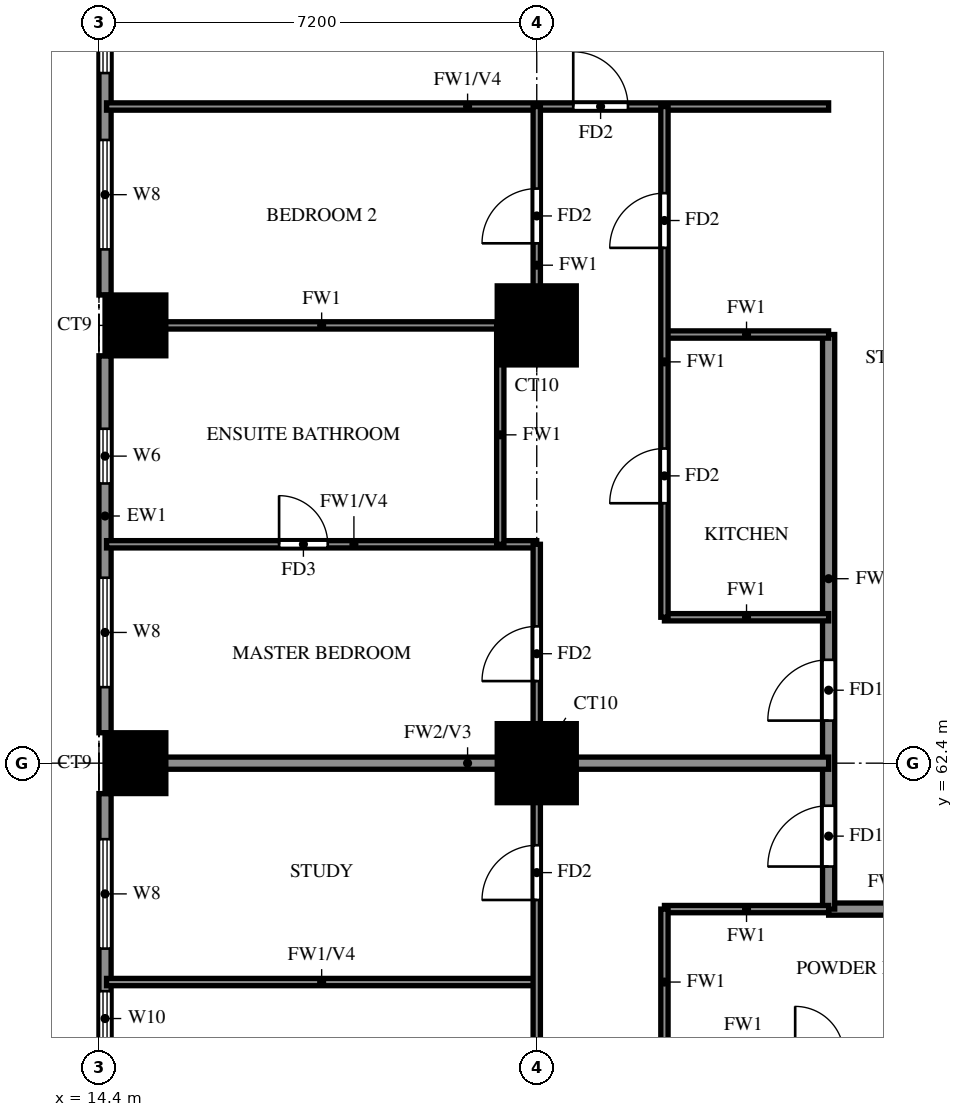
"""IFC4 building model, lengths in metres.
Left out: names, types, materials, properties, quantities, classifications, styles, units other than length and angle.
Written with IfcOpenShell. Run it as: python <this file> out.ifc"""

import sys

from ifc_helpers import new_model, si_unit, direction, frame, frame_2d, origin, origin_2d, place, context, subcontext, project, spatial, rectangle, extrude, source, transform, mapped, element, fill, save


model = new_model("IFC4")
c1 = context("Model", 3, precision=1e-05, world=origin(), true_north=direction((0.0, 1.0)))
c2 = subcontext(c1, "Body", "Model", "MODEL_VIEW")
j1 = project(units=[si_unit("LENGTHUNIT", "METRE"), si_unit("PLANEANGLEUNIT", "RADIAN")], contexts=[c1])
p1 = place(None, origin())
s1 = spatial("IfcSite", under=j1, at=p1, CompositionType="ELEMENT")
p2 = place(p1, origin())
s2 = spatial("IfcBuilding", under=s1, at=p2, CompositionType="ELEMENT")
p3 = place(p2, frame((0.0, 0.0, 83.0)))
s3 = spatial("IfcBuildingStorey", under=s2, at=p3, CompositionType="ELEMENT", Elevation=83.0)
m1 = source(origin(), c2, "Body", "SweptSolid", [
    extrude(rectangle(XDim=1.0, YDim=1.0, at=origin_2d()), origin(), (0.0, 0.0, 1.0), 3.18),
])
p4 = place(p3, frame((15.0, 62.4, 0.0), z_axis=(0.0, 0.0, 1.0), x_axis=(1.0, 0.0, 0.0)))
e1 = element("IfcColumn", 1, at=p4, inside=s3, PredefinedType="COLUMN", context=c2, shape_type="MappedRepresentation", body=[
    mapped(m1, transform((0.0, 0.0, 0.0))),
])
m2 = source(origin(), c2, "Body", "SweptSolid", [
    extrude(rectangle(XDim=1.3, YDim=1.3, at=origin_2d()), origin(), (0.0, 0.0, 1.0), 3.18),
])
p5 = place(p3, frame((21.6, 62.4, 0.0), z_axis=(0.0, 0.0, 1.0), x_axis=(1.0, 0.0, 0.0)))
e2 = element("IfcColumn", 2, at=p5, inside=s3, PredefinedType="COLUMN", context=c2, shape_type="MappedRepresentation", body=[
    mapped(m2, transform((0.0, 0.0, 0.0))),
])
p6 = place(p3, frame((15.0, 69.6, 0.0), z_axis=(0.0, 0.0, 1.0), x_axis=(1.0, 0.0, 0.0)))
e3 = element("IfcColumn", 3, at=p6, inside=s3, PredefinedType="COLUMN", context=c2, shape_type="MappedRepresentation", body=[
    mapped(m1, transform((0.0, 0.0, 0.0))),
])
p7 = place(p3, frame((21.6, 69.6, 0.0), z_axis=(0.0, 0.0, 1.0), x_axis=(1.0, 0.0, 0.0)))
e4 = element("IfcColumn", 4, at=p7, inside=s3, PredefinedType="COLUMN", context=c2, shape_type="MappedRepresentation", body=[
    mapped(m2, transform((0.0, 0.0, 0.0))),
])
p8 = place(p3, frame((14.5, 76.3, 0.0), z_axis=(0.0, 0.0, 1.0), x_axis=(0.0, -1.0, 0.0)))
e5 = element("IfcWall", 5, at=p8, inside=s3, PredefinedType="SOLIDWALL", context=c2, shape_type="SweptSolid", body=[
    extrude(rectangle(XDim=6.2, YDim=0.2, at=frame_2d((3.1, 0.0))), origin(), (0.0, 0.0, 1.0), 3.18),
])
p9 = place(p8, frame((3.65, 0.0, 0.6)))
e6 = element("IfcOpeningElement", 6, at=p9, cuts=e5, PredefinedType="OPENING", context=c2, shape_type="SweptSolid", body=[
    extrude(rectangle(XDim=1.8, YDim=2.4, at=frame_2d((0.9, 1.2))), frame((0.0, 0.11, 0.0), z_axis=(0.0, -1.0, 0.0), x_axis=(1.0, 0.0, 0.0)), (0.0, 0.0, 1.0), 0.22),
])
p10 = place(p8, frame((0.75, 0.0, 0.6)))
e7 = element("IfcOpeningElement", 7, at=p10, cuts=e5, PredefinedType="OPENING", context=c2, shape_type="SweptSolid", body=[
    extrude(rectangle(XDim=1.8, YDim=2.4, at=frame_2d((0.9, 1.2))), frame((0.0, 0.11, 0.0), z_axis=(0.0, -1.0, 0.0), x_axis=(1.0, 0.0, 0.0)), (0.0, 0.0, 1.0), 0.22),
])
p11 = place(p3, frame((14.5, 69.1, 0.0), z_axis=(0.0, 0.0, 1.0), x_axis=(0.0, -1.0, 0.0)))
e8 = element("IfcWall", 8, at=p11, inside=s3, PredefinedType="SOLIDWALL", context=c2, shape_type="SweptSolid", body=[
    extrude(rectangle(XDim=6.2, YDim=0.2, at=frame_2d((3.1, 0.0))), origin(), (0.0, 0.0, 1.0), 3.18),
])
p12 = place(p11, frame((3.65, 0.0, 0.6)))
e9 = element("IfcOpeningElement", 9, at=p12, cuts=e8, PredefinedType="OPENING", context=c2, shape_type="SweptSolid", body=[
    extrude(rectangle(XDim=1.8, YDim=2.4, at=frame_2d((0.9, 1.2))), frame((0.0, 0.11, 0.0), z_axis=(0.0, -1.0, 0.0), x_axis=(1.0, 0.0, 0.0)), (0.0, 0.0, 1.0), 0.22),
])
p13 = place(p11, frame((1.2, 0.0, 1.5)))
e10 = element("IfcOpeningElement", 10, at=p13, cuts=e8, PredefinedType="OPENING", context=c2, shape_type="SweptSolid", body=[
    extrude(rectangle(XDim=0.9, YDim=0.9, at=frame_2d((0.45, 0.45))), frame((0.0, 0.11, 0.0), z_axis=(0.0, -1.0, 0.0), x_axis=(1.0, 0.0, 0.0)), (0.0, 0.0, 1.0), 0.22),
])
p14 = place(p3, frame((14.5, 61.9, 0.0), z_axis=(0.0, 0.0, 1.0), x_axis=(0.0, -1.0, 0.0)))
e11 = element("IfcWall", 11, at=p14, inside=s3, PredefinedType="SOLIDWALL", context=c2, shape_type="SweptSolid", body=[
    extrude(rectangle(XDim=6.2, YDim=0.2, at=frame_2d((3.1, 0.0))), origin(), (0.0, 0.0, 1.0), 3.18),
])
p15 = place(p14, frame((3.25, 0.0, 0.6)))
e12 = element("IfcOpeningElement", 12, at=p15, cuts=e11, PredefinedType="OPENING", context=c2, shape_type="SweptSolid", body=[
    extrude(rectangle(XDim=0.9, YDim=2.4, at=frame_2d((0.45, 1.2))), frame((0.0, 0.11, 0.0), z_axis=(0.0, -1.0, 0.0), x_axis=(1.0, 0.0, 0.0)), (0.0, 0.0, 1.0), 0.22),
])
p16 = place(p14, frame((0.75, 0.0, 0.6)))
e13 = element("IfcOpeningElement", 13, at=p16, cuts=e11, PredefinedType="OPENING", context=c2, shape_type="SweptSolid", body=[
    extrude(rectangle(XDim=1.8, YDim=2.4, at=frame_2d((0.9, 1.2))), frame((0.0, 0.11, 0.0), z_axis=(0.0, -1.0, 0.0), x_axis=(1.0, 0.0, 0.0)), (0.0, 0.0, 1.0), 0.22),
])
p17 = place(p3, frame((26.4, 60.0, 0.0), z_axis=(0.0, 0.0, 1.0), x_axis=(1.0, 0.0, 0.0)))
e14 = element("IfcWall", 14, at=p17, inside=s3, PredefinedType="SOLIDWALL", context=c2, shape_type="SweptSolid", body=[
    extrude(rectangle(XDim=2.4, YDim=0.2, at=frame_2d((1.2, 0.0))), origin(), (0.0, 0.0, 1.0), 3.18),
])
p18 = place(p3, frame((26.4, 60.0, 0.0), z_axis=(0.0, 0.0, 1.0), x_axis=(0.0, 1.0, 0.0)))
e15 = element("IfcWall", 15, at=p18, inside=s3, PredefinedType="SOLIDWALL", context=c2, shape_type="SweptSolid", body=[
    extrude(rectangle(XDim=9.45, YDim=0.2, at=frame_2d((4.725, 0.0))), origin(), (0.0, 0.0, 1.0), 3.18),
])
p19 = place(p18, frame((0.7, 0.0, 0.0)))
e16 = element("IfcOpeningElement", 16, at=p19, cuts=e15, PredefinedType="OPENING", context=c2, shape_type="SweptSolid", body=[
    extrude(rectangle(XDim=1.0, YDim=2.1, at=frame_2d((0.5, 1.05))), frame((0.0, 0.11, 0.0), z_axis=(0.0, -1.0, 0.0), x_axis=(1.0, 0.0, 0.0)), (0.0, 0.0, 1.0), 0.22),
])
p20 = place(p18, frame((3.1, 0.0, 0.0)))
e17 = element("IfcOpeningElement", 17, at=p20, cuts=e15, PredefinedType="OPENING", context=c2, shape_type="SweptSolid", body=[
    extrude(rectangle(XDim=1.0, YDim=2.1, at=frame_2d((0.5, 1.05))), frame((0.0, 0.11, 0.0), z_axis=(0.0, -1.0, 0.0), x_axis=(1.0, 0.0, 0.0)), (0.0, 0.0, 1.0), 0.22),
])
p21 = place(p3, frame((14.525, 62.4, 0.0), z_axis=(0.0, 0.0, 1.0), x_axis=(1.0, 0.0, 0.0)))
e18 = element("IfcWall", 18, at=p21, inside=s3, PredefinedType="SOLIDWALL", context=c2, shape_type="SweptSolid", body=[
    extrude(rectangle(XDim=11.875, YDim=0.2, at=frame_2d((5.938, 0.0))), origin(), (0.0, 0.0, 1.0), 3.18),
])
p22 = place(p3, frame((14.525, 58.8, 0.0), z_axis=(0.0, 0.0, 1.0), x_axis=(1.0, 0.0, 0.0)))
e19 = element("IfcWall", 19, at=p22, inside=s3, PredefinedType="PARTITIONING", context=c2, shape_type="SweptSolid", body=[
    extrude(rectangle(XDim=7.075, YDim=0.12, at=frame_2d((3.538, 0.0))), origin(), (0.0, 0.0, 1.0), 2.28),
])
for number, where, z_axis, x_axis in (
    (20, (23.7, 60.0, 0.0), (0.0, 0.0, 1.0), (1.0, 0.0, 0.0)),
    (21, (23.7, 64.8, 0.0), (0.0, 0.0, 1.0), (1.0, 0.0, 0.0)),
):
    element("IfcWall", number, at=place(p3, frame(where, z_axis=z_axis, x_axis=x_axis)), inside=s3, PredefinedType="PARTITIONING", context=c2, shape_type="SweptSolid", body=[
        extrude(rectangle(XDim=2.7, YDim=0.12, at=frame_2d((1.35, 0.0))), origin(), (0.0, 0.0, 1.0), 3.18),
    ])
p23 = place(p3, frame((14.525, 66.0, 0.0), z_axis=(0.0, 0.0, 1.0), x_axis=(1.0, 0.0, 0.0)))
e22 = element("IfcWall", 22, at=p23, inside=s3, PredefinedType="PARTITIONING", context=c2, shape_type="SweptSolid", body=[
    extrude(rectangle(XDim=7.075, YDim=0.12, at=frame_2d((3.538, 0.0))), origin(), (0.0, 0.0, 1.0), 2.28),
])
p24 = place(p23, frame((2.837, 0.0, 0.0)))
e23 = element("IfcOpeningElement", 23, at=p24, cuts=e22, PredefinedType="OPENING", context=c2, shape_type="SweptSolid", body=[
    extrude(rectangle(XDim=0.8, YDim=2.1, at=frame_2d((0.4, 1.05))), frame((0.0, 0.07, 0.0), z_axis=(0.0, -1.0, 0.0), x_axis=(1.0, 0.0, 0.0)), (0.0, 0.0, 1.0), 0.14),
])
p25 = place(p3, frame((23.7, 69.45, 0.0), z_axis=(0.0, 0.0, 1.0), x_axis=(1.0, 0.0, 0.0)))
e24 = element("IfcWall", 24, at=p25, inside=s3, PredefinedType="PARTITIONING", context=c2, shape_type="SweptSolid", body=[
    extrude(rectangle(XDim=2.7, YDim=0.12, at=frame_2d((1.35, 0.0))), origin(), (0.0, 0.0, 1.0), 3.18),
])
p26 = place(p3, frame((14.525, 69.6, 0.0), z_axis=(0.0, 0.0, 1.0), x_axis=(1.0, 0.0, 0.0)))
e25 = element("IfcWall", 25, at=p26, inside=s3, PredefinedType="PARTITIONING", context=c2, shape_type="SweptSolid", body=[
    extrude(rectangle(XDim=7.075, YDim=0.12, at=frame_2d((3.538, 0.0))), origin(), (0.0, 0.0, 1.0), 3.18),
])
p27 = place(p3, frame((14.525, 73.2, 0.0), z_axis=(0.0, 0.0, 1.0), x_axis=(1.0, 0.0, 0.0)))
e26 = element("IfcWall", 26, at=p27, inside=s3, PredefinedType="PARTITIONING", context=c2, shape_type="SweptSolid", body=[
    extrude(rectangle(XDim=11.875, YDim=0.12, at=frame_2d((5.938, 0.0))), origin(), (0.0, 0.0, 1.0), 2.28),
])
p28 = place(p27, frame((7.675, 0.0, 0.0)))
e27 = element("IfcOpeningElement", 27, at=p28, cuts=e26, PredefinedType="OPENING", context=c2, shape_type="SweptSolid", body=[
    extrude(rectangle(XDim=0.9, YDim=2.1, at=frame_2d((0.45, 1.05))), frame((0.0, 0.07, 0.0), z_axis=(0.0, -1.0, 0.0), x_axis=(1.0, 0.0, 0.0)), (0.0, 0.0, 1.0), 0.14),
])
p29 = place(p3, frame((21.0, 66.0, 0.0), z_axis=(0.0, 0.0, 1.0), x_axis=(0.0, 1.0, 0.0)))
e28 = element("IfcWall", 28, at=p29, inside=s3, PredefinedType="PARTITIONING", context=c2, shape_type="SweptSolid", body=[
    extrude(rectangle(XDim=3.6, YDim=0.12, at=frame_2d((1.8, 0.0))), origin(), (0.0, 0.0, 1.0), 3.18),
])
p30 = place(p3, frame((21.6, 33.725, 0.0), z_axis=(0.0, 0.0, 1.0), x_axis=(0.0, 1.0, 0.0)))
e29 = element("IfcWall", 29, at=p30, inside=s3, PredefinedType="PARTITIONING", context=c2, shape_type="SweptSolid", body=[
    extrude(rectangle(XDim=32.275, YDim=0.12, at=frame_2d((16.137, 0.0))), origin(), (0.0, 0.0, 1.0), 3.18),
])
p31 = place(p30, frame((7.775, 0.0, 0.0)))
e30 = element("IfcOpeningElement", 30, at=p31, cuts=e29, PredefinedType="OPENING", context=c2, shape_type="SweptSolid", body=[
    extrude(rectangle(XDim=0.9, YDim=2.1, at=frame_2d((0.45, 1.05))), frame((0.0, 0.07, 0.0), z_axis=(0.0, -1.0, 0.0), x_axis=(1.0, 0.0, 0.0)), (0.0, 0.0, 1.0), 0.14),
])
p32 = place(p30, frame((15.625, 0.0, 0.0)))
e31 = element("IfcOpeningElement", 31, at=p32, cuts=e29, PredefinedType="OPENING", context=c2, shape_type="SweptSolid", body=[
    extrude(rectangle(XDim=0.9, YDim=2.1, at=frame_2d((0.45, 1.05))), frame((0.0, 0.07, 0.0), z_axis=(0.0, -1.0, 0.0), x_axis=(1.0, 0.0, 0.0)), (0.0, 0.0, 1.0), 0.14),
])
p33 = place(p30, frame((22.225, 0.0, 0.0)))
e32 = element("IfcOpeningElement", 32, at=p33, cuts=e29, PredefinedType="OPENING", context=c2, shape_type="SweptSolid", body=[
    extrude(rectangle(XDim=1.5, YDim=2.1, at=frame_2d((0.75, 1.05))), frame((0.0, 0.07, 0.0), z_axis=(0.0, -1.0, 0.0), x_axis=(1.0, 0.0, 0.0)), (0.0, 0.0, 1.0), 0.14),
])
p34 = place(p30, frame((26.425, 0.0, 0.0)))
e33 = element("IfcOpeningElement", 33, at=p34, cuts=e29, PredefinedType="OPENING", context=c2, shape_type="SweptSolid", body=[
    extrude(rectangle(XDim=0.9, YDim=2.1, at=frame_2d((0.45, 1.05))), frame((0.0, 0.07, 0.0), z_axis=(0.0, -1.0, 0.0), x_axis=(1.0, 0.0, 0.0)), (0.0, 0.0, 1.0), 0.14),
])
p35 = place(p30, frame((30.025, 0.0, 0.0)))
e34 = element("IfcOpeningElement", 34, at=p35, cuts=e29, PredefinedType="OPENING", context=c2, shape_type="SweptSolid", body=[
    extrude(rectangle(XDim=0.9, YDim=2.1, at=frame_2d((0.45, 1.05))), frame((0.0, 0.07, 0.0), z_axis=(0.0, -1.0, 0.0), x_axis=(1.0, 0.0, 0.0)), (0.0, 0.0, 1.0), 0.14),
])
p36 = place(p3, frame((21.6, 69.6, 0.0), z_axis=(0.0, 0.0, 1.0), x_axis=(0.0, 1.0, 0.0)))
e35 = element("IfcWall", 35, at=p36, inside=s3, PredefinedType="PARTITIONING", context=c2, shape_type="SweptSolid", body=[
    extrude(rectangle(XDim=3.6, YDim=0.12, at=frame_2d((1.8, 0.0))), origin(), (0.0, 0.0, 1.0), 3.18),
])
p37 = place(p36, frame((1.35, 0.0, 0.0)))
e36 = element("IfcOpeningElement", 36, at=p37, cuts=e35, PredefinedType="OPENING", context=c2, shape_type="SweptSolid", body=[
    extrude(rectangle(XDim=0.9, YDim=2.1, at=frame_2d((0.45, 1.05))), frame((0.0, 0.07, 0.0), z_axis=(0.0, -1.0, 0.0), x_axis=(1.0, 0.0, 0.0)), (0.0, 0.0, 1.0), 0.14),
])
p38 = place(p3, frame((23.7, 57.6, 0.0), z_axis=(0.0, 0.0, 1.0), x_axis=(0.0, 1.0, 0.0)))
e37 = element("IfcWall", 37, at=p38, inside=s3, PredefinedType="PARTITIONING", context=c2, shape_type="SweptSolid", body=[
    extrude(rectangle(XDim=2.4, YDim=0.12, at=frame_2d((1.2, 0.0))), origin(), (0.0, 0.0, 1.0), 3.18),
])
p39 = place(p3, frame((23.7, 64.8, 0.0), z_axis=(0.0, 0.0, 1.0), x_axis=(0.0, 1.0, 0.0)))
e38 = element("IfcWall", 38, at=p39, inside=s3, PredefinedType="PARTITIONING", context=c2, shape_type="SweptSolid", body=[
    extrude(rectangle(XDim=8.4, YDim=0.12, at=frame_2d((4.2, 0.0))), origin(), (0.0, 0.0, 1.0), 3.18),
])
p40 = place(p39, frame((1.875, 0.0, 0.0)))
e39 = element("IfcOpeningElement", 39, at=p40, cuts=e38, PredefinedType="OPENING", context=c2, shape_type="SweptSolid", body=[
    extrude(rectangle(XDim=0.9, YDim=2.1, at=frame_2d((0.45, 1.05))), frame((0.0, 0.07, 0.0), z_axis=(0.0, -1.0, 0.0), x_axis=(1.0, 0.0, 0.0)), (0.0, 0.0, 1.0), 0.14),
])
p41 = place(p39, frame((6.075, 0.0, 0.0)))
e40 = element("IfcOpeningElement", 40, at=p41, cuts=e38, PredefinedType="OPENING", context=c2, shape_type="SweptSolid", body=[
    extrude(rectangle(XDim=0.9, YDim=2.1, at=frame_2d((0.45, 1.05))), frame((0.0, 0.07, 0.0), z_axis=(0.0, -1.0, 0.0), x_axis=(1.0, 0.0, 0.0)), (0.0, 0.0, 1.0), 0.14),
])
p42 = place(p9, origin())
e41 = element("IfcWindow", 41, at=p42, inside=s3, PartitioningType="DOUBLE_PANEL_VERTICAL", PredefinedType="WINDOW", context=c2, shape_type="SweptSolid", body=[
    extrude(rectangle(XDim=1.8, YDim=2.4, at=frame_2d((0.9, 1.2))), frame((0.0, 0.03, 0.0), z_axis=(0.0, -1.0, 0.0), x_axis=(1.0, 0.0, 0.0)), (0.0, 0.0, 1.0), 0.06),
])
fill(e6, e41)
p43 = place(p10, origin())
e42 = element("IfcWindow", 42, at=p43, inside=s3, PartitioningType="DOUBLE_PANEL_VERTICAL", PredefinedType="WINDOW", context=c2, shape_type="SweptSolid", body=[
    extrude(rectangle(XDim=1.8, YDim=2.4, at=frame_2d((0.9, 1.2))), frame((0.0, 0.03, 0.0), z_axis=(0.0, -1.0, 0.0), x_axis=(1.0, 0.0, 0.0)), (0.0, 0.0, 1.0), 0.06),
])
fill(e7, e42)
p44 = place(p12, origin())
e43 = element("IfcWindow", 43, at=p44, inside=s3, PartitioningType="DOUBLE_PANEL_VERTICAL", PredefinedType="WINDOW", context=c2, shape_type="SweptSolid", body=[
    extrude(rectangle(XDim=1.8, YDim=2.4, at=frame_2d((0.9, 1.2))), frame((0.0, 0.03, 0.0), z_axis=(0.0, -1.0, 0.0), x_axis=(1.0, 0.0, 0.0)), (0.0, 0.0, 1.0), 0.06),
])
fill(e9, e43)
p45 = place(p13, origin())
e44 = element("IfcWindow", 44, at=p45, inside=s3, PartitioningType="SINGLE_PANEL", PredefinedType="WINDOW", context=c2, shape_type="SweptSolid", body=[
    extrude(rectangle(XDim=0.9, YDim=0.9, at=frame_2d((0.45, 0.45))), frame((0.0, 0.03, 0.0), z_axis=(0.0, -1.0, 0.0), x_axis=(1.0, 0.0, 0.0)), (0.0, 0.0, 1.0), 0.06),
])
fill(e10, e44)
p46 = place(p15, origin())
e45 = element("IfcWindow", 45, at=p46, inside=s3, PartitioningType="SINGLE_PANEL", PredefinedType="WINDOW", context=c2, shape_type="SweptSolid", body=[
    extrude(rectangle(XDim=0.9, YDim=2.4, at=frame_2d((0.45, 1.2))), frame((0.0, 0.03, 0.0), z_axis=(0.0, -1.0, 0.0), x_axis=(1.0, 0.0, 0.0)), (0.0, 0.0, 1.0), 0.06),
])
fill(e12, e45)
p47 = place(p16, origin())
e46 = element("IfcWindow", 46, at=p47, inside=s3, PartitioningType="DOUBLE_PANEL_VERTICAL", PredefinedType="WINDOW", context=c2, shape_type="SweptSolid", body=[
    extrude(rectangle(XDim=1.8, YDim=2.4, at=frame_2d((0.9, 1.2))), frame((0.0, 0.03, 0.0), z_axis=(0.0, -1.0, 0.0), x_axis=(1.0, 0.0, 0.0)), (0.0, 0.0, 1.0), 0.06),
])
fill(e13, e46)
p48 = place(p19, origin())
e47 = element("IfcDoor", 47, at=p48, inside=s3, OperationType="SINGLE_SWING_RIGHT", PredefinedType="DOOR", context=c2, shape_type="SweptSolid", body=[
    extrude(rectangle(XDim=1.0, YDim=2.1, at=frame_2d((0.5, 1.05))), frame((0.0, 0.025, 0.0), z_axis=(0.0, -1.0, 0.0), x_axis=(1.0, 0.0, 0.0)), (0.0, 0.0, 1.0), 0.05),
])
fill(e16, e47)
p49 = place(p34, origin())
e48 = element("IfcDoor", 48, at=p49, inside=s3, OperationType="SINGLE_SWING_RIGHT", PredefinedType="DOOR", context=c2, shape_type="SweptSolid", body=[
    extrude(rectangle(XDim=0.9, YDim=2.1, at=frame_2d((0.45, 1.05))), frame((0.0, 0.025, 0.0), z_axis=(0.0, -1.0, 0.0), x_axis=(1.0, 0.0, 0.0)), (0.0, 0.0, 1.0), 0.05),
])
fill(e33, e48)
p50 = place(p20, origin())
e49 = element("IfcDoor", 49, at=p50, inside=s3, OperationType="SINGLE_SWING_LEFT", PredefinedType="DOOR", context=c2, shape_type="SweptSolid", body=[
    extrude(rectangle(XDim=1.0, YDim=2.1, at=frame_2d((0.5, 1.05))), frame((0.0, 0.025, 0.0), z_axis=(0.0, -1.0, 0.0), x_axis=(1.0, 0.0, 0.0)), (0.0, 0.0, 1.0), 0.05),
])
fill(e17, e49)
p51 = place(p35, origin())
e50 = element("IfcDoor", 50, at=p51, inside=s3, OperationType="SINGLE_SWING_RIGHT", PredefinedType="DOOR", context=c2, shape_type="SweptSolid", body=[
    extrude(rectangle(XDim=0.9, YDim=2.1, at=frame_2d((0.45, 1.05))), frame((0.0, 0.025, 0.0), z_axis=(0.0, -1.0, 0.0), x_axis=(1.0, 0.0, 0.0)), (0.0, 0.0, 1.0), 0.05),
])
fill(e34, e50)
p52 = place(p24, origin())
e51 = element("IfcDoor", 51, at=p52, inside=s3, OperationType="SINGLE_SWING_LEFT", PredefinedType="DOOR", context=c2, shape_type="SweptSolid", body=[
    extrude(rectangle(XDim=0.8, YDim=2.1, at=frame_2d((0.4, 1.05))), frame((0.0, 0.025, 0.0), z_axis=(0.0, -1.0, 0.0), x_axis=(1.0, 0.0, 0.0)), (0.0, 0.0, 1.0), 0.05),
])
fill(e23, e51)
p53 = place(p37, origin())
e52 = element("IfcDoor", 52, at=p53, inside=s3, OperationType="SINGLE_SWING_LEFT", PredefinedType="DOOR", context=c2, shape_type="SweptSolid", body=[
    extrude(rectangle(XDim=0.9, YDim=2.1, at=frame_2d((0.45, 1.05))), frame((0.0, 0.025, 0.0), z_axis=(0.0, -1.0, 0.0), x_axis=(1.0, 0.0, 0.0)), (0.0, 0.0, 1.0), 0.05),
])
fill(e36, e52)
p54 = place(p28, origin())
e53 = element("IfcDoor", 53, at=p54, inside=s3, OperationType="SINGLE_SWING_RIGHT", PredefinedType="DOOR", context=c2, shape_type="SweptSolid", body=[
    extrude(rectangle(XDim=0.9, YDim=2.1, at=frame_2d((0.45, 1.05))), frame((0.0, 0.025, 0.0), z_axis=(0.0, -1.0, 0.0), x_axis=(1.0, 0.0, 0.0)), (0.0, 0.0, 1.0), 0.05),
])
fill(e27, e53)
p55 = place(p40, origin())
e54 = element("IfcDoor", 54, at=p55, inside=s3, OperationType="SINGLE_SWING_LEFT", PredefinedType="DOOR", context=c2, shape_type="SweptSolid", body=[
    extrude(rectangle(XDim=0.9, YDim=2.1, at=frame_2d((0.45, 1.05))), frame((0.0, 0.025, 0.0), z_axis=(0.0, -1.0, 0.0), x_axis=(1.0, 0.0, 0.0)), (0.0, 0.0, 1.0), 0.05),
])
fill(e39, e54)
p56 = place(p41, origin())
e55 = element("IfcDoor", 55, at=p56, inside=s3, OperationType="SINGLE_SWING_LEFT", PredefinedType="DOOR", context=c2, shape_type="SweptSolid", body=[
    extrude(rectangle(XDim=0.9, YDim=2.1, at=frame_2d((0.45, 1.05))), frame((0.0, 0.025, 0.0), z_axis=(0.0, -1.0, 0.0), x_axis=(1.0, 0.0, 0.0)), (0.0, 0.0, 1.0), 0.05),
])
fill(e40, e55)
save(model, sys.argv[1])
